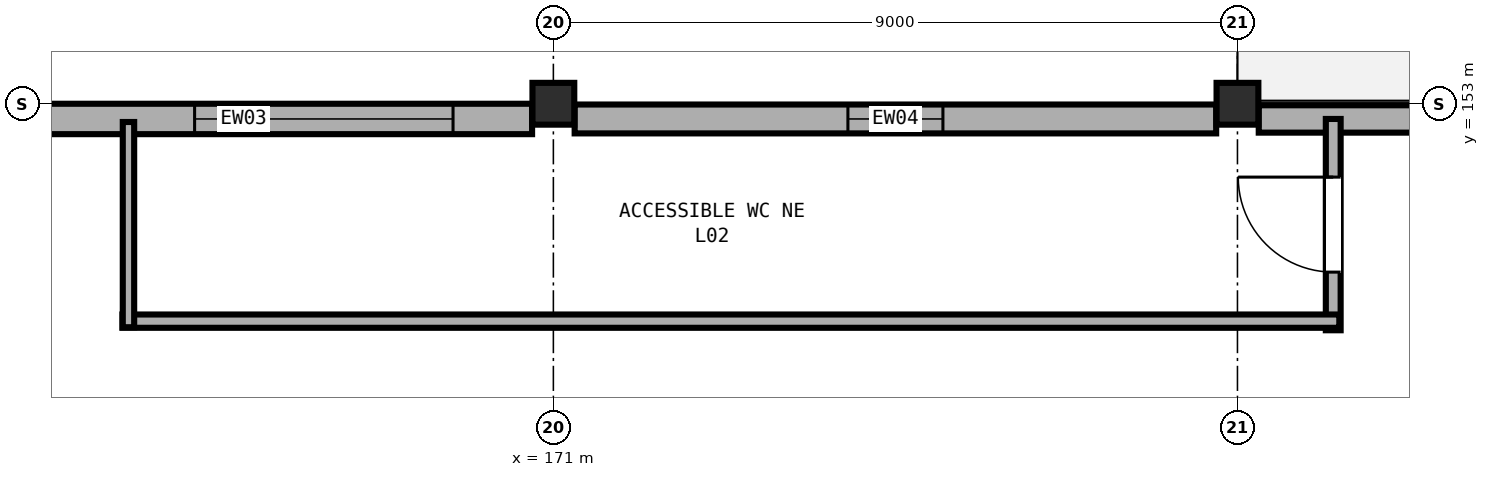
"""IFC4 building model, lengths in metres.
Left out: names, types, materials, properties, quantities, classifications, styles, units other than length and angle.
Written with IfcOpenShell. Run it as: python <this file> out.ifc"""

import sys

from ifc_helpers import new_model, si_unit, direction, frame, frame_2d, origin, origin_2d, place, context, subcontext, project, spatial, rectangle, extrude, element, fill, save


model = new_model("IFC4")
c1 = context("Model", 3, precision=1e-05, world=origin(), true_north=direction((0.0, 1.0)))
c2 = subcontext(c1, "Body", "Model", "MODEL_VIEW")
j1 = project(units=[si_unit("LENGTHUNIT", "METRE"), si_unit("PLANEANGLEUNIT", "RADIAN")], contexts=[c1])
p1 = place(None, origin())
s1 = spatial("IfcSite", under=j1, at=p1, CompositionType="ELEMENT")
p2 = place(p1, origin())
s2 = spatial("IfcBuilding", under=s1, at=p2, CompositionType="ELEMENT")
p3 = place(p2, frame((0.0, 0.0, 9.6)))
s3 = spatial("IfcBuildingStorey", under=s2, at=p3, CompositionType="ELEMENT", Elevation=9.6)
for number, where, z_axis, x_axis in (
    (1, (171.0, 153.0, 0.0), (0.0, 0.0, 1.0), (1.0, 0.0, 0.0)),
    (2, (180.0, 153.0, 0.0), (0.0, 0.0, 1.0), (1.0, 0.0, 0.0)),
):
    element("IfcColumn", number, at=place(p3, frame(where, z_axis=z_axis, x_axis=x_axis)), inside=s3, PredefinedType="COLUMN", context=c2, shape_type="SweptSolid", body=[
        extrude(rectangle(XDim=0.55, YDim=0.55, at=origin_2d()), origin(), (0.0, 0.0, 1.0), 4.8),
    ])
p4 = place(p3, frame((163.13, 152.8, 0.0), z_axis=(0.0, 0.0, 1.0), x_axis=(1.0, 0.0, 0.0)))
e3 = element("IfcWall", 3, at=p4, inside=s3, PredefinedType="SOLIDWALL", context=c2, shape_type="SweptSolid", body=[
    extrude(rectangle(XDim=7.59, YDim=0.4, at=frame_2d((3.795, 0.0))), origin(), (0.0, 0.0, 1.0), 3.58),
])
p5 = place(p4, frame((3.15, 0.0, 0.9)))
e4 = element("IfcOpeningElement", 4, at=p5, cuts=e3, PredefinedType="OPENING", context=c2, shape_type="SweptSolid", body=[
    extrude(rectangle(XDim=3.4, YDim=1.95, at=frame_2d((1.7, 0.975))), frame((0.0, 0.21, 0.0), z_axis=(0.0, -1.0, 0.0), x_axis=(1.0, 0.0, 0.0)), (0.0, 0.0, 1.0), 0.42),
])
p6 = place(p3, frame((171.28, 152.8, 0.0), z_axis=(0.0, 0.0, 1.0), x_axis=(1.0, 0.0, 0.0)))
e5 = element("IfcWall", 5, at=p6, inside=s3, PredefinedType="SOLIDWALL", context=c2, shape_type="SweptSolid", body=[
    extrude(rectangle(XDim=8.44, YDim=0.38, at=frame_2d((4.22, 0.0))), origin(), (0.0, 0.0, 1.0), 3.58),
])
p7 = place(p6, frame((3.595, 0.0, 0.9)))
e6 = element("IfcOpeningElement", 6, at=p7, cuts=e5, PredefinedType="OPENING", context=c2, shape_type="SweptSolid", body=[
    extrude(rectangle(XDim=1.25, YDim=1.8, at=frame_2d((0.625, 0.9))), frame((0.0, 0.2, 0.0), z_axis=(0.0, -1.0, 0.0), x_axis=(1.0, 0.0, 0.0)), (0.0, 0.0, 1.0), 0.4),
])
p8 = place(p3, frame((180.28, 152.8, 0.0), z_axis=(0.0, 0.0, 1.0), x_axis=(1.0, 0.0, 0.0)))
e7 = element("IfcWall", 7, at=p8, inside=s3, PredefinedType="SOLIDWALL", context=c2, shape_type="SweptSolid", body=[
    extrude(rectangle(XDim=8.44, YDim=0.36, at=frame_2d((4.22, 0.0))), origin(), (0.0, 0.0, 1.0), 3.58),
])
p9 = place(p8, frame((3.495, 0.0, 0.9)))
e8 = element("IfcOpeningElement", 8, at=p9, cuts=e7, PredefinedType="OPENING", context=c2, shape_type="SweptSolid", body=[
    extrude(rectangle(XDim=1.45, YDim=1.85, at=frame_2d((0.725, 0.925))), frame((0.0, 0.19, 0.0), z_axis=(0.0, -1.0, 0.0), x_axis=(1.0, 0.0, 0.0)), (0.0, 0.0, 1.0), 0.38),
])
p10 = place(p3, frame((181.26, 150.02, 0.0), z_axis=(0.0, 0.0, 1.0), x_axis=(0.0, 1.0, 0.0)))
e9 = element("IfcWall", 9, at=p10, inside=s3, PredefinedType="PARTITIONING", context=c2, shape_type="SweptSolid", body=[
    extrude(rectangle(XDim=2.78, YDim=0.195, at=frame_2d((1.39, 0.0))), origin(), (0.0, 0.0, 1.0), 3.56),
])
p11 = place(p10, frame((0.765, 0.0, 0.0)))
e10 = element("IfcOpeningElement", 10, at=p11, cuts=e9, PredefinedType="OPENING", context=c2, shape_type="SweptSolid", body=[
    extrude(rectangle(XDim=1.25, YDim=2.15, at=frame_2d((0.625, 1.075))), frame((0.0, 0.107, 0.0), z_axis=(0.0, -1.0, 0.0), x_axis=(1.0, 0.0, 0.0)), (0.0, 0.0, 1.0), 0.215),
])
p12 = place(p3, frame((181.34, 150.14, 0.0), z_axis=(0.0, 0.0, 1.0), x_axis=(-1.0, 0.0, 0.0)))
e11 = element("IfcWall", 11, at=p12, inside=s3, PredefinedType="PARTITIONING", context=c2, shape_type="SweptSolid", body=[
    extrude(rectangle(XDim=16.01, YDim=0.175, at=frame_2d((8.005, 0.0))), origin(), (0.0, 0.0, 1.0), 3.56),
])
p13 = place(p3, frame((165.41, 150.06, 0.0), z_axis=(0.0, 0.0, 1.0), x_axis=(0.0, 1.0, 0.0)))
e12 = element("IfcWall", 12, at=p13, inside=s3, PredefinedType="PARTITIONING", context=c2, shape_type="SweptSolid", body=[
    extrude(rectangle(XDim=2.7, YDim=0.15, at=frame_2d((1.35, 0.0))), origin(), (0.0, 0.0, 1.0), 3.56),
])
p14 = place(p5, origin())
e13 = element("IfcWindow", 13, at=p14, inside=s3, PartitioningType="DOUBLE_PANEL_VERTICAL", PredefinedType="WINDOW", context=c2, shape_type="SweptSolid", body=[
    extrude(rectangle(XDim=3.4, YDim=1.95, at=frame_2d((1.7, 0.975))), frame((0.0, 0.03, 0.0), z_axis=(0.0, -1.0, 0.0), x_axis=(1.0, 0.0, 0.0)), (0.0, 0.0, 1.0), 0.06),
])
fill(e4, e13)
p15 = place(p7, origin())
e14 = element("IfcWindow", 14, at=p15, inside=s3, PartitioningType="SINGLE_PANEL", PredefinedType="WINDOW", context=c2, shape_type="SweptSolid", body=[
    extrude(rectangle(XDim=1.25, YDim=1.8, at=frame_2d((0.625, 0.9))), frame((0.0, 0.03, 0.0), z_axis=(0.0, -1.0, 0.0), x_axis=(1.0, 0.0, 0.0)), (0.0, 0.0, 1.0), 0.06),
])
fill(e6, e14)
p16 = place(p11, origin())
e15 = element("IfcDoor", 15, at=p16, inside=s3, OperationType="SINGLE_SWING_RIGHT", PredefinedType="DOOR", context=c2, shape_type="SweptSolid", body=[
    extrude(rectangle(XDim=1.25, YDim=2.15, at=frame_2d((0.625, 1.075))), frame((0.0, 0.025, 0.0), z_axis=(0.0, -1.0, 0.0), x_axis=(1.0, 0.0, 0.0)), (0.0, 0.0, 1.0), 0.05),
])
fill(e10, e15)
save(model, sys.argv[1])
